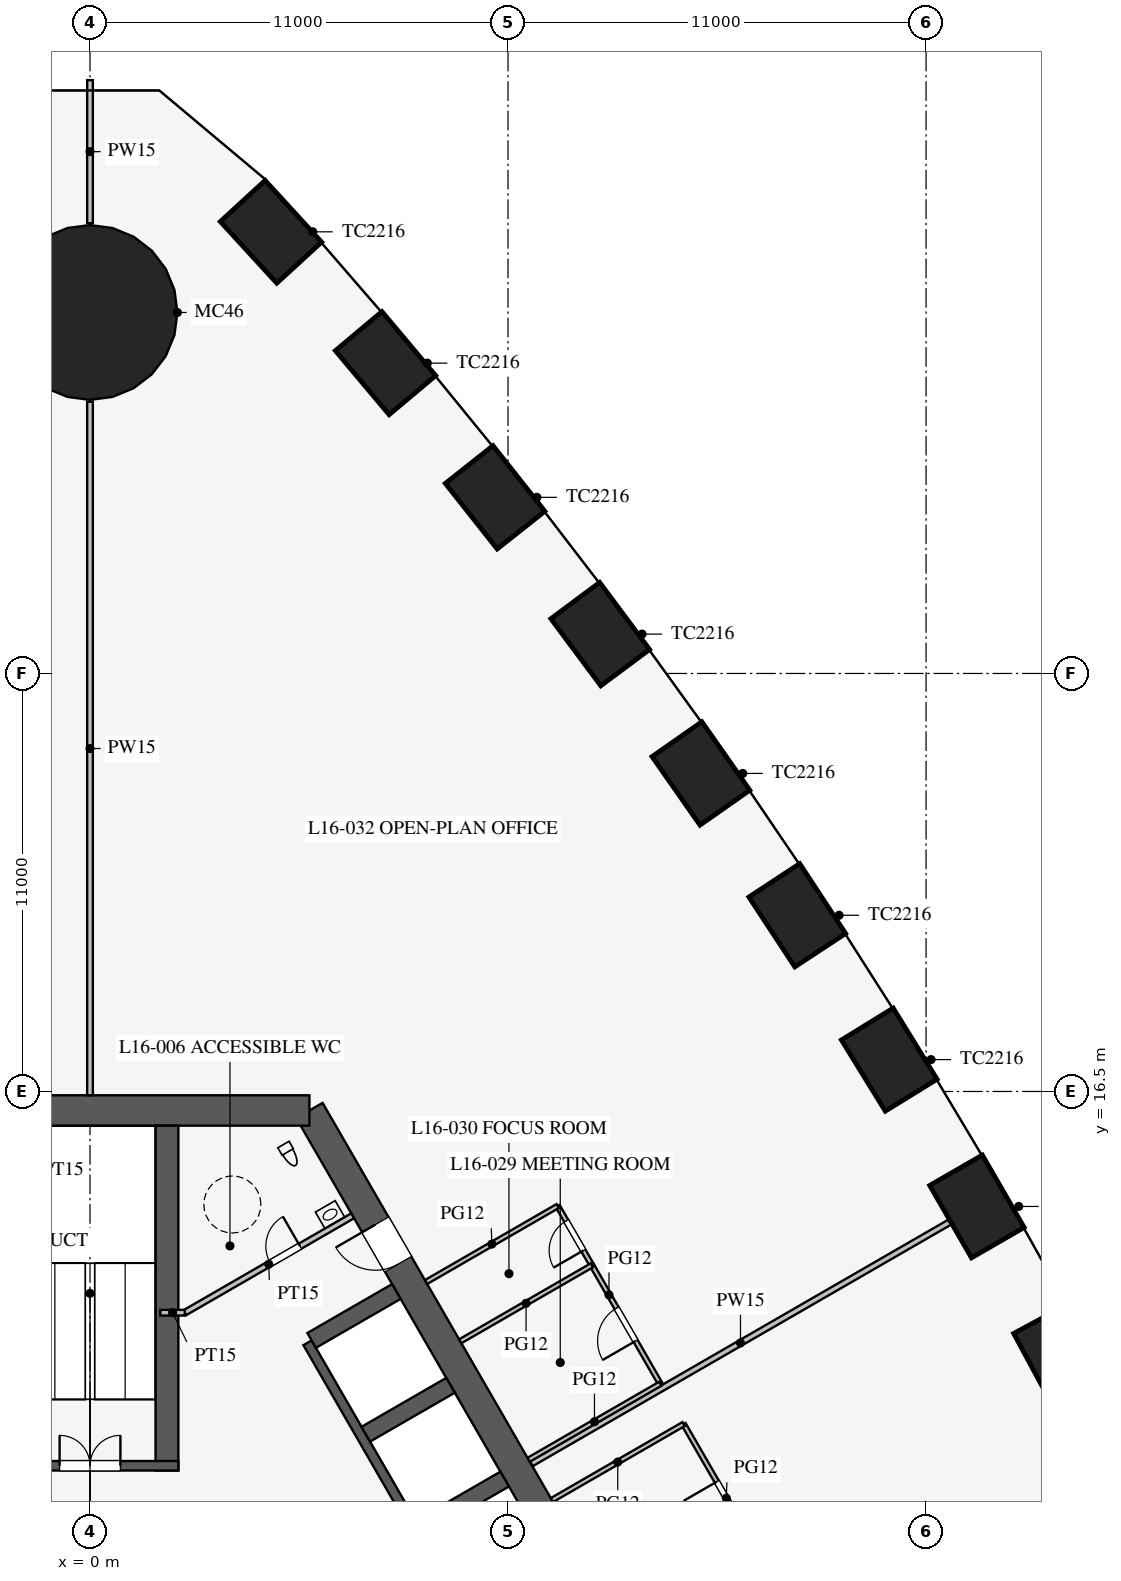
"""IFC4 building model, lengths in metres.
Left out: names, types, materials, properties, quantities, classifications, styles, units other than length and angle.
Written with IfcOpenShell. Run it as: python <this file> out.ifc"""

import sys

from ifc_helpers import new_model, si_unit, direction, frame, frame_2d, origin, origin_2d, place, context, subcontext, project, spatial, rectangle, circle, extrude, element, fill, save


model = new_model("IFC4")
c1 = context("Model", 3, precision=1e-05, world=origin(), true_north=direction((0.0, 1.0)))
c2 = subcontext(c1, "Body", "Model", "MODEL_VIEW")
j1 = project(units=[si_unit("LENGTHUNIT", "METRE"), si_unit("PLANEANGLEUNIT", "RADIAN")], contexts=[c1])
p1 = place(None, origin())
s1 = spatial("IfcSite", under=j1, at=p1, CompositionType="ELEMENT")
p2 = place(p1, origin())
s2 = spatial("IfcBuilding", under=s1, at=p2, CompositionType="ELEMENT")
p3 = place(p2, frame((0.0, 0.0, 71.1)))
s3 = spatial("IfcBuildingStorey", under=s2, at=p3, CompositionType="ELEMENT", Elevation=71.1)
for number, where, z_axis, x_axis in (
    (1, (25.531, 9.544, 0.0), (0.0, 0.0, 1.0), (-0.475, 0.88, 0.0)),
    (2, (23.338, 13.474, 0.0), (0.0, 0.0, 1.0), (-0.5, 0.866, 0.0)),
    (3, (21.031, 17.339, 0.0), (0.0, 0.0, 1.0), (-0.525, 0.851, 0.0)),
    (4, (18.611, 21.137, 0.0), (0.0, 0.0, 1.0), (-0.549, 0.836, 0.0)),
    (5, (16.076, 24.87, 0.0), (0.0, 0.0, 1.0), (-0.574, 0.819, 0.0)),
    (6, (13.426, 28.536, 0.0), (0.0, 0.0, 1.0), (-0.597, 0.802, 0.0)),
    (7, (10.66, 32.135, 0.0), (0.0, 0.0, 1.0), (-0.62, 0.784, 0.0)),
    (8, (7.776, 35.667, 0.0), (0.0, 0.0, 1.0), (-0.643, 0.766, 0.0)),
    (9, (4.762, 39.122, 0.0), (0.0, 0.0, 1.0), (-0.676, 0.737, 0.0)),
):
    element("IfcColumn", number, at=place(p3, frame(where, z_axis=z_axis, x_axis=x_axis)), inside=s3, PredefinedType="COLUMN", context=c2, shape_type="SweptSolid", body=[
        extrude(rectangle(XDim=2.2, YDim=1.6, at=origin_2d()), origin(), (0.0, 0.0, 1.0), 4.2),
    ])
p4 = place(p3, frame((0.0, 37.0, 0.0), z_axis=(0.0, 0.0, 1.0), x_axis=(1.0, 0.0, 0.0)))
e10 = element("IfcColumn", 10, at=p4, inside=s3, PredefinedType="COLUMN", context=c2, shape_type="SweptSolid", body=[
    extrude(circle(Radius=2.3, at=origin_2d()), origin(), (0.0, 0.0, 1.0), 4.2),
])
p5 = place(p3, frame((16.743, -3.0, 0.0), z_axis=(0.0, 0.0, 1.0), x_axis=(-0.500002442456, 0.866023993627, 0.0)))
e11 = element("IfcWall", 11, at=p5, inside=s3, PredefinedType="SHEAR", context=c2, shape_type="SweptSolid", body=[
    extrude(rectangle(XDim=21.939, YDim=0.8, at=frame_2d((10.97, 0.0))), origin(), (0.0, 0.0, 1.0), 4.2),
])
p6 = place(p5, frame((17.27, 0.0, 0.0)))
e12 = element("IfcOpeningElement", 12, at=p6, cuts=e11, PredefinedType="OPENING", context=c2, shape_type="SweptSolid", body=[
    extrude(rectangle(XDim=1.2, YDim=2.1, at=frame_2d((0.6, 1.05))), frame((0.0, 0.41, 0.0), z_axis=(0.0, -1.0, 0.0), x_axis=(1.0, 0.0, 0.0)), (0.0, 0.0, 1.0), 0.82),
])
p7 = place(p5, frame((3.47, 0.0, 0.0)))
e13 = element("IfcOpeningElement", 13, at=p7, cuts=e11, PredefinedType="OPENING", context=c2, shape_type="SweptSolid", body=[
    extrude(rectangle(XDim=1.2, YDim=2.1, at=frame_2d((0.6, 1.05))), frame((0.0, 0.41, 0.0), z_axis=(0.0, -1.0, 0.0), x_axis=(1.0, 0.0, 0.0)), (0.0, 0.0, 1.0), 0.82),
])
p8 = place(p3, frame((5.773, 16.0, 0.0), z_axis=(0.0, 0.0, 1.0), x_axis=(-1.0, 0.0, 0.0)))
e14 = element("IfcWall", 14, at=p8, inside=s3, PredefinedType="SHEAR", context=c2, shape_type="SweptSolid", body=[
    extrude(rectangle(XDim=11.547, YDim=0.8, at=frame_2d((5.773, 0.0))), origin(), (0.0, 0.0, 1.0), 4.2),
])
p9 = place(p3, frame((11.424, 0.014, 0.0), z_axis=(0.0, 0.0, 1.0), x_axis=(-0.500001763848, 0.866024385424, 0.0)))
e15 = element("IfcWall", 15, at=p9, inside=s3, PredefinedType="SHEAR", context=c2, shape_type="SweptSolid", body=[
    extrude(rectangle(XDim=11.4, YDim=0.25, at=frame_2d((5.7, 0.0))), origin(), (0.0, 0.0, 1.0), 4.2),
])
for number, where, z_axis, x_axis in (
    (16, (8.682, 5.012, 0.0), (0.0, 0.0, 1.0), (0.866, 0.5, 0.0)),
    (17, (7.257, 7.481, 0.0), (0.0, 0.0, 1.0), (0.866, 0.5, 0.0)),
):
    element("IfcWall", number, at=place(p3, frame(where, z_axis=z_axis, x_axis=x_axis)), inside=s3, PredefinedType="SHEAR", context=c2, shape_type="SweptSolid", body=[
        extrude(rectangle(XDim=2.575, YDim=0.45, at=frame_2d((1.288, 0.0))), origin(), (0.0, 0.0, 1.0), 4.2),
    ])
p10 = place(p3, frame((5.832, 9.949, 0.0), z_axis=(0.0, 0.0, 1.0), x_axis=(0.866029291668, 0.499993265928, 0.0)))
e18 = element("IfcWall", 18, at=p10, inside=s3, PredefinedType="SHEAR", context=c2, shape_type="SweptSolid", body=[
    extrude(rectangle(XDim=2.575, YDim=0.45, at=frame_2d((1.288, 0.0))), origin(), (0.0, 0.0, 1.0), 4.2),
])
p11 = place(p3, frame((2.025, 6.525, 0.0), z_axis=(0.0, 0.0, 1.0), x_axis=(0.0, 1.0, 0.0)))
e19 = element("IfcWall", 19, at=p11, inside=s3, PredefinedType="SHEAR", context=c2, shape_type="SweptSolid", body=[
    extrude(rectangle(XDim=9.075, YDim=0.6, at=frame_2d((4.538, 0.0))), origin(), (0.0, 0.0, 1.0), 4.2),
])
p12 = place(p3, frame((2.325, 6.65, 0.0), z_axis=(0.0, 0.0, 1.0), x_axis=(-1.0, 0.0, 0.0)))
e20 = element("IfcWall", 20, at=p12, inside=s3, PredefinedType="SHEAR", context=c2, shape_type="SweptSolid", body=[
    extrude(rectangle(XDim=4.65, YDim=0.25, at=frame_2d((2.325, 0.0))), origin(), (0.0, 0.0, 1.0), 4.2),
])
p13 = place(p12, frame((1.525, 0.0, 0.0)))
e21 = element("IfcOpeningElement", 21, at=p13, cuts=e20, PredefinedType="OPENING", context=c2, shape_type="SweptSolid", body=[
    extrude(rectangle(XDim=1.6, YDim=2.1, at=frame_2d((0.8, 1.05))), frame((0.0, 0.135, 0.0), z_axis=(0.0, -1.0, 0.0), x_axis=(1.0, 0.0, 0.0)), (0.0, 0.0, 1.0), 0.27),
])
p14 = place(p3, frame((2.495, 10.678, 0.0), z_axis=(0.0, 0.0, 1.0), x_axis=(0.86602216432, 0.500005610874, 0.0)))
e22 = element("IfcWall", 22, at=p14, inside=s3, PredefinedType="PARTITIONING", context=c2, shape_type="SweptSolid", body=[
    extrude(rectangle(XDim=5.1, YDim=0.15, at=frame_2d((2.55, 0.0))), origin(), (0.0, 0.0, 1.0), 4.0),
])
p15 = place(p14, frame((2.6, 0.0, 0.0)))
e23 = element("IfcOpeningElement", 23, at=p15, cuts=e22, PredefinedType="OPENING", context=c2, shape_type="SweptSolid", body=[
    extrude(rectangle(XDim=0.9, YDim=2.1, at=frame_2d((0.45, 1.05))), frame((0.0, 0.085, 0.0), z_axis=(0.0, -1.0, 0.0), x_axis=(1.0, 0.0, 0.0)), (0.0, 0.0, 1.0), 0.17),
])
p16 = place(p3, frame((2.495, 10.678, 0.0), z_axis=(0.0, 0.0, 1.0), x_axis=(-1.0, 0.0, 0.0)))
e24 = element("IfcWall", 24, at=p16, inside=s3, PredefinedType="PARTITIONING", context=c2, shape_type="SweptSolid", body=[
    extrude(rectangle(XDim=0.645, YDim=0.15, at=frame_2d((0.323, 0.0))), origin(), (0.0, 0.0, 1.0), 4.0),
])
p17 = place(p3, frame((0.0, 16.4, 0.0), z_axis=(0.0, 0.0, 1.0), x_axis=(0.0, 1.0, 0.0)))
e25 = element("IfcWall", 25, at=p17, inside=s3, PredefinedType="PARTITIONING", context=c2, shape_type="SweptSolid", body=[
    extrude(rectangle(XDim=18.25, YDim=0.15, at=frame_2d((9.125, 0.0))), origin(), (0.0, 0.0, 1.0), 2.3),
])
p18 = place(p3, frame((0.0, 39.35, 0.0), z_axis=(0.0, 0.0, 1.0), x_axis=(0.0, 1.0, 0.0)))
e26 = element("IfcWall", 26, at=p18, inside=s3, PredefinedType="PARTITIONING", context=c2, shape_type="SweptSolid", body=[
    extrude(rectangle(XDim=3.764, YDim=0.15, at=frame_2d((1.882, 0.0))), origin(), (0.0, 0.0, 1.0), 2.3),
])
p19 = place(p3, frame((11.613, 6.705, 0.0), z_axis=(0.0, 0.0, 1.0), x_axis=(0.866029791586, 0.499992400027, 0.0)))
e27 = element("IfcWall", 27, at=p19, inside=s3, PredefinedType="PARTITIONING", context=c2, shape_type="SweptSolid", body=[
    extrude(rectangle(XDim=12.709, YDim=0.15, at=frame_2d((6.354, 0.0))), origin(), (0.0, 0.0, 1.0), 2.8),
])
p20 = place(p3, frame((15.006, 8.808, 0.0), z_axis=(0.0, 0.0, 1.0), x_axis=(-0.500012057535, 0.866018442252, 0.0)))
e28 = element("IfcWall", 28, at=p20, inside=s3, PredefinedType="PARTITIONING", context=c2, shape_type="SweptSolid", body=[
    extrude(rectangle(XDim=3.6, YDim=0.12, at=frame_2d((1.8, 0.0))), origin(), (0.0, 0.0, 1.0), 2.9),
])
p21 = place(p20, frame((1.3, 0.0, 0.15)))
e29 = element("IfcOpeningElement", 29, at=p21, cuts=e28, PredefinedType="OPENING", context=c2, shape_type="SweptSolid", body=[
    extrude(rectangle(XDim=1.0, YDim=2.1, at=frame_2d((0.5, 1.05))), frame((0.0, 0.07, 0.0), z_axis=(0.0, -1.0, 0.0), x_axis=(1.0, 0.0, 0.0)), (0.0, 0.0, 1.0), 0.14),
])
p22 = place(p3, frame((13.206, 11.926, 0.0), z_axis=(0.0, 0.0, 1.0), x_axis=(-0.499961193289, 0.866047807691, 0.0)))
e30 = element("IfcWall", 30, at=p22, inside=s3, PredefinedType="PARTITIONING", context=c2, shape_type="SweptSolid", body=[
    extrude(rectangle(XDim=1.8, YDim=0.12, at=frame_2d((0.9, 0.0))), origin(), (0.0, 0.0, 1.0), 2.9),
])
p23 = place(p22, frame((0.45, 0.0, 0.15)))
e31 = element("IfcOpeningElement", 31, at=p23, cuts=e30, PredefinedType="OPENING", context=c2, shape_type="SweptSolid", body=[
    extrude(rectangle(XDim=0.9, YDim=2.1, at=frame_2d((0.45, 1.05))), frame((0.0, 0.07, 0.0), z_axis=(0.0, -1.0, 0.0), x_axis=(1.0, 0.0, 0.0)), (0.0, 0.0, 1.0), 0.14),
])
p24 = place(p3, frame((17.869, 3.85, 0.0), z_axis=(0.0, 0.0, 1.0), x_axis=(-0.500013631625, 0.866017533419, 0.0)))
e32 = element("IfcWall", 32, at=p24, inside=s3, PredefinedType="PARTITIONING", context=c2, shape_type="SweptSolid", body=[
    extrude(rectangle(XDim=4.5, YDim=0.12, at=frame_2d((2.25, 0.0))), origin(), (0.0, 0.0, 1.0), 2.9),
])
p25 = place(p24, frame((1.75, 0.0, 0.15)))
e33 = element("IfcOpeningElement", 33, at=p25, cuts=e32, PredefinedType="OPENING", context=c2, shape_type="SweptSolid", body=[
    extrude(rectangle(XDim=1.0, YDim=2.1, at=frame_2d((0.5, 1.05))), frame((0.0, 0.07, 0.0), z_axis=(0.0, -1.0, 0.0), x_axis=(1.0, 0.0, 0.0)), (0.0, 0.0, 1.0), 0.14),
])
p26 = place(p3, frame((11.542, 6.808, 0.0), z_axis=(0.0, 0.0, 1.0), x_axis=(0.866026010844, 0.49999894854, 0.0)))
e34 = element("IfcWall", 34, at=p26, inside=s3, PredefinedType="PARTITIONING", context=c2, shape_type="SweptSolid", body=[
    extrude(rectangle(XDim=4.0, YDim=0.12, at=frame_2d((2.0, 0.0))), origin(), (0.0, 0.0, 1.0), 2.8),
])
for number, where, z_axis, x_axis in (
    (35, (9.742, 9.926, 0.0), (0.0, 0.0, 1.0), (0.866, 0.5, 0.0)),
    (36, (8.842, 11.485, 0.0), (0.0, 0.0, 1.0), (0.866, 0.5, 0.0)),
    (37, (12.155, 5.747, 0.0), (0.0, 0.0, 1.0), (0.866, 0.5, 0.0)),
):
    element("IfcWall", number, at=place(p3, frame(where, z_axis=z_axis, x_axis=x_axis)), inside=s3, PredefinedType="PARTITIONING", context=c2, shape_type="SweptSolid", body=[
        extrude(rectangle(XDim=4.0, YDim=0.12, at=frame_2d((2.0, 0.0))), origin(), (0.0, 0.0, 1.0), 2.9),
    ])
p27 = place(p15, origin())
e38 = element("IfcDoor", 38, at=p27, inside=s3, OperationType="SINGLE_SWING_RIGHT", PredefinedType="DOOR", context=c2, shape_type="SweptSolid", body=[
    extrude(rectangle(XDim=0.9, YDim=2.1, at=frame_2d((0.45, 1.05))), frame((0.0, 0.025, 0.0), z_axis=(0.0, -1.0, 0.0), x_axis=(1.0, 0.0, 0.0)), (0.0, 0.0, 1.0), 0.05),
])
fill(e23, e38)
p28 = place(p13, frame((1.6, 0.0, 0.0), z_axis=(0.0, 0.0, 1.0), x_axis=(-1.0, 0.0, 0.0)))
e39 = element("IfcDoor", 39, at=p28, inside=s3, OperationType="DOUBLE_DOOR_SINGLE_SWING", PredefinedType="DOOR", context=c2, shape_type="SweptSolid", body=[
    extrude(rectangle(XDim=1.6, YDim=2.1, at=frame_2d((0.8, 1.05))), frame((0.0, 0.025, 0.0), z_axis=(0.0, -1.0, 0.0), x_axis=(1.0, 0.0, 0.0)), (0.0, 0.0, 1.0), 0.05),
])
fill(e21, e39)
p29 = place(p6, origin())
e40 = element("IfcDoor", 40, at=p29, inside=s3, OperationType="SINGLE_SWING_RIGHT", PredefinedType="DOOR", context=c2, shape_type="SweptSolid", body=[
    extrude(rectangle(XDim=1.2, YDim=2.1, at=frame_2d((0.6, 1.05))), frame((0.0, 0.025, 0.0), z_axis=(0.0, -1.0, 0.0), x_axis=(1.0, 0.0, 0.0)), (0.0, 0.0, 1.0), 0.05),
])
fill(e12, e40)
p30 = place(p25, origin())
e41 = element("IfcDoor", 41, at=p30, inside=s3, OperationType="SINGLE_SWING_RIGHT", PredefinedType="DOOR", context=c2, shape_type="SweptSolid", body=[
    extrude(rectangle(XDim=1.0, YDim=2.1, at=frame_2d((0.5, 1.05))), frame((0.0, 0.025, 0.0), z_axis=(0.0, -1.0, 0.0), x_axis=(1.0, 0.0, 0.0)), (0.0, 0.0, 1.0), 0.05),
])
fill(e33, e41)
p31 = place(p21, origin())
e42 = element("IfcDoor", 42, at=p31, inside=s3, OperationType="SINGLE_SWING_LEFT", PredefinedType="DOOR", context=c2, shape_type="SweptSolid", body=[
    extrude(rectangle(XDim=1.0, YDim=2.1, at=frame_2d((0.5, 1.05))), frame((0.0, 0.025, 0.0), z_axis=(0.0, -1.0, 0.0), x_axis=(1.0, 0.0, 0.0)), (0.0, 0.0, 1.0), 0.05),
])
fill(e29, e42)
p32 = place(p23, origin())
e43 = element("IfcDoor", 43, at=p32, inside=s3, OperationType="SINGLE_SWING_LEFT", PredefinedType="DOOR", context=c2, shape_type="SweptSolid", body=[
    extrude(rectangle(XDim=0.9, YDim=2.1, at=frame_2d((0.45, 1.05))), frame((0.0, 0.025, 0.0), z_axis=(0.0, -1.0, 0.0), x_axis=(1.0, 0.0, 0.0)), (0.0, 0.0, 1.0), 0.05),
])
fill(e31, e43)
save(model, sys.argv[1])
